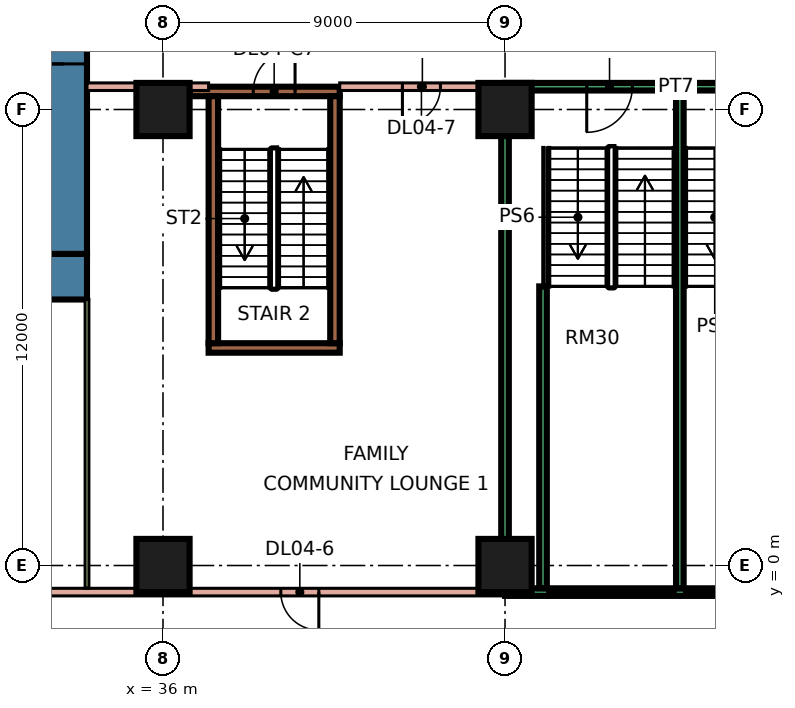
"""IFC4 building model, lengths in metres.
Left out: names, types, materials, properties, quantities, classifications, styles, units other than length and angle.
Written with IfcOpenShell. Run it as: python <this file> out.ifc"""

import sys

from ifc_helpers import new_model, si_unit, direction, frame, frame_2d, origin, origin_2d, place, context, subcontext, project, spatial, rectangle, extrude, element, fill, save


model = new_model("IFC4")
c1 = context("Model", 3, precision=1e-05, world=origin(), true_north=direction((0.0, 1.0)))
c2 = subcontext(c1, "Body", "Model", "MODEL_VIEW")
j1 = project(units=[si_unit("LENGTHUNIT", "METRE"), si_unit("PLANEANGLEUNIT", "RADIAN")], contexts=[c1])
p1 = place(None, origin())
s1 = spatial("IfcSite", under=j1, at=p1, CompositionType="ELEMENT")
p2 = place(p1, origin())
s2 = spatial("IfcBuilding", under=s1, at=p2, CompositionType="ELEMENT")
p3 = place(p2, frame((0.0, 0.0, 21.6)))
s3 = spatial("IfcBuildingStorey", under=s2, at=p3, CompositionType="ELEMENT", Elevation=21.6)
for number, where, z_axis, x_axis in (
    (1, (36.0, 0.0, 0.0), (0.0, 0.0, 1.0), (1.0, 0.0, 0.0)),
    (2, (45.0, 0.0, 0.0), (0.0, 0.0, 1.0), (1.0, 0.0, 0.0)),
    (3, (36.0, 12.0, 0.0), (0.0, 0.0, 1.0), (1.0, 0.0, 0.0)),
    (4, (45.0, 12.0, 0.0), (0.0, 0.0, 1.0), (1.0, 0.0, 0.0)),
):
    element("IfcColumn", number, at=place(p3, frame(where, z_axis=z_axis, x_axis=x_axis)), inside=s3, PredefinedType="COLUMN", context=c2, shape_type="SweptSolid", body=[
        extrude(rectangle(XDim=1.4, YDim=1.4, at=origin_2d()), origin(), (0.0, 0.0, 1.0), 4.8),
    ])
p4 = place(p3, frame((9.0, 7.6, 0.0), z_axis=(0.0, 0.0, 1.0), x_axis=(1.0, 0.0, 0.0)))
e5 = element("IfcWall", 5, at=p4, inside=s3, PredefinedType="SHEAR", context=c2, shape_type="SweptSolid", body=[
    extrude(rectangle(XDim=25.0, YDim=1.2, at=frame_2d((12.5, 0.0))), origin(), (0.0, 0.0, 1.0), 4.8),
])
p5 = place(p3, frame((33.4, 8.2, 0.0), z_axis=(0.0, 0.0, 1.0), x_axis=(0.0, 1.0, 0.0)))
e6 = element("IfcWall", 6, at=p5, inside=s3, PredefinedType="SHEAR", context=c2, shape_type="SweptSolid", body=[
    extrude(rectangle(XDim=10.6, YDim=1.2, at=frame_2d((5.3, 0.0))), origin(), (0.0, 0.0, 1.0), 4.8),
])
p6 = place(p5, frame((5.0, 0.0, 0.0)))
e7 = element("IfcOpeningElement", 7, at=p6, cuts=e6, PredefinedType="OPENING", context=c2, shape_type="SweptSolid", body=[
    extrude(rectangle(XDim=1.8, YDim=2.4, at=frame_2d((0.9, 1.2))), frame((0.0, 0.61, 0.0), z_axis=(0.0, -1.0, 0.0), x_axis=(1.0, 0.0, 0.0)), (0.0, 0.0, 1.0), 1.22),
])
p7 = place(p3, frame((37.2, 5.725, 0.0), z_axis=(0.0, 0.0, 1.0), x_axis=(1.0, 0.0, 0.0)))
e8 = element("IfcWall", 8, at=p7, inside=s3, PredefinedType="SHEAR", context=c2, shape_type="SweptSolid", body=[
    extrude(rectangle(XDim=3.45, YDim=0.25, at=frame_2d((1.725, 0.0))), origin(), (0.0, 0.0, 1.0), 4.8),
])
p8 = place(p3, frame((36.7, 12.475, 0.0), z_axis=(0.0, 0.0, 1.0), x_axis=(1.0, 0.0, 0.0)))
e9 = element("IfcWall", 9, at=p8, inside=s3, PredefinedType="SHEAR", context=c2, shape_type="SweptSolid", body=[
    extrude(rectangle(XDim=3.95, YDim=0.25, at=frame_2d((1.975, 0.0))), origin(), (0.0, 0.0, 1.0), 4.8),
])
p9 = place(p8, frame((1.675, 0.0, 0.0)))
e10 = element("IfcOpeningElement", 10, at=p9, cuts=e9, PredefinedType="OPENING", context=c2, shape_type="SweptSolid", body=[
    extrude(rectangle(XDim=1.1, YDim=2.2, at=frame_2d((0.55, 1.1))), frame((0.0, 0.135, 0.0), z_axis=(0.0, -1.0, 0.0), x_axis=(1.0, 0.0, 0.0)), (0.0, 0.0, 1.0), 0.27),
])
for number, where, z_axis, x_axis in (
    (11, (37.325, 5.85, 0.0), (0.0, 0.0, 1.0), (0.0, 1.0, 0.0)),
    (12, (40.525, 5.85, 0.0), (0.0, 0.0, 1.0), (0.0, 1.0, 0.0)),
):
    element("IfcWall", number, at=place(p3, frame(where, z_axis=z_axis, x_axis=x_axis)), inside=s3, PredefinedType="SHEAR", context=c2, shape_type="SweptSolid", body=[
        extrude(rectangle(XDim=6.5, YDim=0.25, at=frame_2d((3.25, 0.0))), origin(), (0.0, 0.0, 1.0), 4.8),
    ])
p10 = place(p3, frame((3.073, -0.7, 0.0), z_axis=(0.0, 0.0, 1.0), x_axis=(1.0, 0.0, 0.0)))
e13 = element("IfcWall", 13, at=p10, inside=s3, PredefinedType="PARTITIONING", context=c2, shape_type="SweptSolid", body=[
    extrude(rectangle(XDim=41.927, YDim=0.2, at=frame_2d((20.963, 0.0))), origin(), (0.0, 0.0, 1.0), 4.4),
])
p11 = place(p10, frame((36.027, 0.0, 0.0)))
e14 = element("IfcOpeningElement", 14, at=p11, cuts=e13, PredefinedType="OPENING", context=c2, shape_type="SweptSolid", body=[
    extrude(rectangle(XDim=1.0, YDim=2.1, at=frame_2d((0.5, 1.05))), frame((0.0, 0.11, 0.0), z_axis=(0.0, -1.0, 0.0), x_axis=(1.0, 0.0, 0.0)), (0.0, 0.0, 1.0), 0.22),
])
p12 = place(p10, frame((4.527, 0.0, 0.0)))
e15 = element("IfcOpeningElement", 15, at=p12, cuts=e13, PredefinedType="OPENING", context=c2, shape_type="SweptSolid", body=[
    extrude(rectangle(XDim=1.0, YDim=2.1, at=frame_2d((0.5, 1.05))), frame((0.0, 0.11, 0.0), z_axis=(0.0, -1.0, 0.0), x_axis=(1.0, 0.0, 0.0)), (0.0, 0.0, 1.0), 0.22),
])
p13 = place(p10, frame((7.027, 0.0, 0.0)))
e16 = element("IfcOpeningElement", 16, at=p13, cuts=e13, PredefinedType="OPENING", context=c2, shape_type="SweptSolid", body=[
    extrude(rectangle(XDim=1.0, YDim=2.1, at=frame_2d((0.5, 1.05))), frame((0.0, 0.11, 0.0), z_axis=(0.0, -1.0, 0.0), x_axis=(1.0, 0.0, 0.0)), (0.0, 0.0, 1.0), 0.22),
])
p14 = place(p10, frame((14.527, 0.0, 0.0)))
e17 = element("IfcOpeningElement", 17, at=p14, cuts=e13, PredefinedType="OPENING", context=c2, shape_type="SweptSolid", body=[
    extrude(rectangle(XDim=1.0, YDim=2.1, at=frame_2d((0.5, 1.05))), frame((0.0, 0.11, 0.0), z_axis=(0.0, -1.0, 0.0), x_axis=(1.0, 0.0, 0.0)), (0.0, 0.0, 1.0), 0.22),
])
p15 = place(p10, frame((25.527, 0.0, 0.0)))
e18 = element("IfcOpeningElement", 18, at=p15, cuts=e13, PredefinedType="OPENING", context=c2, shape_type="SweptSolid", body=[
    extrude(rectangle(XDim=1.0, YDim=2.1, at=frame_2d((0.5, 1.05))), frame((0.0, 0.11, 0.0), z_axis=(0.0, -1.0, 0.0), x_axis=(1.0, 0.0, 0.0)), (0.0, 0.0, 1.0), 0.22),
])
p16 = place(p3, frame((34.0, -0.6, 0.0), z_axis=(0.0, 0.0, 1.0), x_axis=(0.0, 1.0, 0.0)))
e19 = element("IfcWall", 19, at=p16, inside=s3, PredefinedType="PARTITIONING", context=c2, shape_type="SweptSolid", body=[
    extrude(rectangle(XDim=7.6, YDim=0.1, at=frame_2d((3.8, 0.0))), origin(), (0.0, 0.0, 1.0), 4.4),
])
p17 = place(p3, frame((34.0, 12.6, 0.0), z_axis=(0.0, 0.0, 1.0), x_axis=(1.0, 0.0, 0.0)))
e20 = element("IfcWall", 20, at=p17, inside=s3, PredefinedType="PARTITIONING", context=c2, shape_type="SweptSolid", body=[
    extrude(rectangle(XDim=3.2, YDim=0.2, at=frame_2d((1.6, 0.0))), origin(), (0.0, 0.0, 1.0), 4.4),
])
p18 = place(p3, frame((40.65, 12.6, 0.0), z_axis=(0.0, 0.0, 1.0), x_axis=(1.0, 0.0, 0.0)))
e21 = element("IfcWall", 21, at=p18, inside=s3, PredefinedType="PARTITIONING", context=c2, shape_type="SweptSolid", body=[
    extrude(rectangle(XDim=4.35, YDim=0.2, at=frame_2d((2.175, 0.0))), origin(), (0.0, 0.0, 1.0), 4.4),
])
p19 = place(p18, frame((1.65, 0.0, 0.0)))
e22 = element("IfcOpeningElement", 22, at=p19, cuts=e21, PredefinedType="OPENING", context=c2, shape_type="SweptSolid", body=[
    extrude(rectangle(XDim=1.0, YDim=2.1, at=frame_2d((0.5, 1.05))), frame((0.0, 0.11, 0.0), z_axis=(0.0, -1.0, 0.0), x_axis=(1.0, 0.0, 0.0)), (0.0, 0.0, 1.0), 0.22),
])
p20 = place(p3, frame((45.0, -0.7, 0.0), z_axis=(0.0, 0.0, 1.0), x_axis=(1.0, 0.0, 0.0)))
e23 = element("IfcWall", 23, at=p20, inside=s3, PredefinedType="SOLIDWALL", context=c2, shape_type="SweptSolid", body=[
    extrude(rectangle(XDim=9.0, YDim=0.2, at=frame_2d((4.5, 0.0))), origin(), (0.0, 0.0, 1.0), 4.4),
])
p21 = place(p3, frame((45.0, -0.6, 0.0), z_axis=(0.0, 0.0, 1.0), x_axis=(0.0, 1.0, 0.0)))
e24 = element("IfcWall", 24, at=p21, inside=s3, PredefinedType="SOLIDWALL", context=c2, shape_type="SweptSolid", body=[
    extrude(rectangle(XDim=13.1, YDim=0.2, at=frame_2d((6.55, 0.0))), origin(), (0.0, 0.0, 1.0), 4.4),
])
p22 = place(p3, frame((45.0, 12.6, 0.0), z_axis=(0.0, 0.0, 1.0), x_axis=(1.0, 0.0, 0.0)))
e25 = element("IfcWall", 25, at=p22, inside=s3, PredefinedType="SOLIDWALL", context=c2, shape_type="SweptSolid", body=[
    extrude(rectangle(XDim=9.0, YDim=0.2, at=frame_2d((4.5, 0.0))), origin(), (0.0, 0.0, 1.0), 4.4),
])
p23 = place(p22, frame((5.75, 0.0, 0.0)))
e26 = element("IfcOpeningElement", 26, at=p23, cuts=e25, PredefinedType="OPENING", context=c2, shape_type="SweptSolid", body=[
    extrude(rectangle(XDim=1.2, YDim=2.1, at=frame_2d((0.6, 1.05))), frame((0.0, 0.11, 0.0), z_axis=(0.0, -1.0, 0.0), x_axis=(1.0, 0.0, 0.0)), (0.0, 0.0, 1.0), 0.22),
])
p24 = place(p22, frame((2.15, 0.0, 0.0)))
e27 = element("IfcOpeningElement", 27, at=p24, cuts=e25, PredefinedType="OPENING", context=c2, shape_type="SweptSolid", body=[
    extrude(rectangle(XDim=1.2, YDim=2.1, at=frame_2d((0.6, 1.05))), frame((0.0, 0.11, 0.0), z_axis=(0.0, -1.0, 0.0), x_axis=(1.0, 0.0, 0.0)), (0.0, 0.0, 1.0), 0.22),
])
p25 = place(p3, frame((49.6, -0.6, 0.0), z_axis=(0.0, 0.0, 1.0), x_axis=(0.0, 1.0, 0.0)))
e28 = element("IfcWall", 28, at=p25, inside=s3, PredefinedType="SOLIDWALL", context=c2, shape_type="SweptSolid", body=[
    extrude(rectangle(XDim=13.1, YDim=0.2, at=frame_2d((6.55, 0.0))), origin(), (0.0, 0.0, 1.0), 4.4),
])
p26 = place(p3, frame((46.0, -0.6, 0.0), z_axis=(0.0, 0.0, 1.0), x_axis=(0.0, 1.0, 0.0)))
e29 = element("IfcWall", 29, at=p26, inside=s3, PredefinedType="SOLIDWALL", context=c2, shape_type="SweptSolid", body=[
    extrude(rectangle(XDim=7.945, YDim=0.2, at=frame_2d((3.973, 0.0))), origin(), (0.0, 0.0, 1.0), 4.4),
])
p27 = place(p6, origin())
e30 = element("IfcDoor", 30, at=p27, inside=s3, OperationType="DOUBLE_DOOR_SINGLE_SWING", PredefinedType="DOOR", context=c2, shape_type="SweptSolid", body=[
    extrude(rectangle(XDim=1.8, YDim=2.4, at=frame_2d((0.9, 1.2))), frame((0.0, 0.025, 0.0), z_axis=(0.0, -1.0, 0.0), x_axis=(1.0, 0.0, 0.0)), (0.0, 0.0, 1.0), 0.05),
])
fill(e7, e30)
p28 = place(p9, frame((1.1, 0.0, 0.0), z_axis=(0.0, 0.0, 1.0), x_axis=(-1.0, 0.0, 0.0)))
e31 = element("IfcDoor", 31, at=p28, inside=s3, OperationType="SINGLE_SWING_RIGHT", PredefinedType="DOOR", context=c2, shape_type="SweptSolid", body=[
    extrude(rectangle(XDim=1.1, YDim=2.2, at=frame_2d((0.55, 1.1))), frame((0.0, 0.025, 0.0), z_axis=(0.0, -1.0, 0.0), x_axis=(1.0, 0.0, 0.0)), (0.0, 0.0, 1.0), 0.05),
])
fill(e10, e31)
p29 = place(p11, origin())
e32 = element("IfcDoor", 32, at=p29, inside=s3, OperationType="SINGLE_SWING_RIGHT", PredefinedType="DOOR", context=c2, shape_type="SweptSolid", body=[
    extrude(rectangle(XDim=1.0, YDim=2.1, at=frame_2d((0.5, 1.05))), frame((0.0, 0.025, 0.0), z_axis=(0.0, -1.0, 0.0), x_axis=(1.0, 0.0, 0.0)), (0.0, 0.0, 1.0), 0.05),
])
fill(e14, e32)
p30 = place(p19, frame((1.0, 0.0, 0.0), z_axis=(0.0, 0.0, 1.0), x_axis=(-1.0, 0.0, 0.0)))
e33 = element("IfcDoor", 33, at=p30, inside=s3, OperationType="SINGLE_SWING_LEFT", PredefinedType="DOOR", context=c2, shape_type="SweptSolid", body=[
    extrude(rectangle(XDim=1.0, YDim=2.1, at=frame_2d((0.5, 1.05))), frame((0.0, 0.025, 0.0), z_axis=(0.0, -1.0, 0.0), x_axis=(1.0, 0.0, 0.0)), (0.0, 0.0, 1.0), 0.05),
])
fill(e22, e33)
p31 = place(p24, frame((1.2, 0.0, 0.0), z_axis=(0.0, 0.0, 1.0), x_axis=(-1.0, 0.0, 0.0)))
e34 = element("IfcDoor", 34, at=p31, inside=s3, OperationType="SINGLE_SWING_LEFT", PredefinedType="DOOR", context=c2, shape_type="SweptSolid", body=[
    extrude(rectangle(XDim=1.2, YDim=2.1, at=frame_2d((0.6, 1.05))), frame((0.0, 0.025, 0.0), z_axis=(0.0, -1.0, 0.0), x_axis=(1.0, 0.0, 0.0)), (0.0, 0.0, 1.0), 0.05),
])
fill(e27, e34)
save(model, sys.argv[1])
